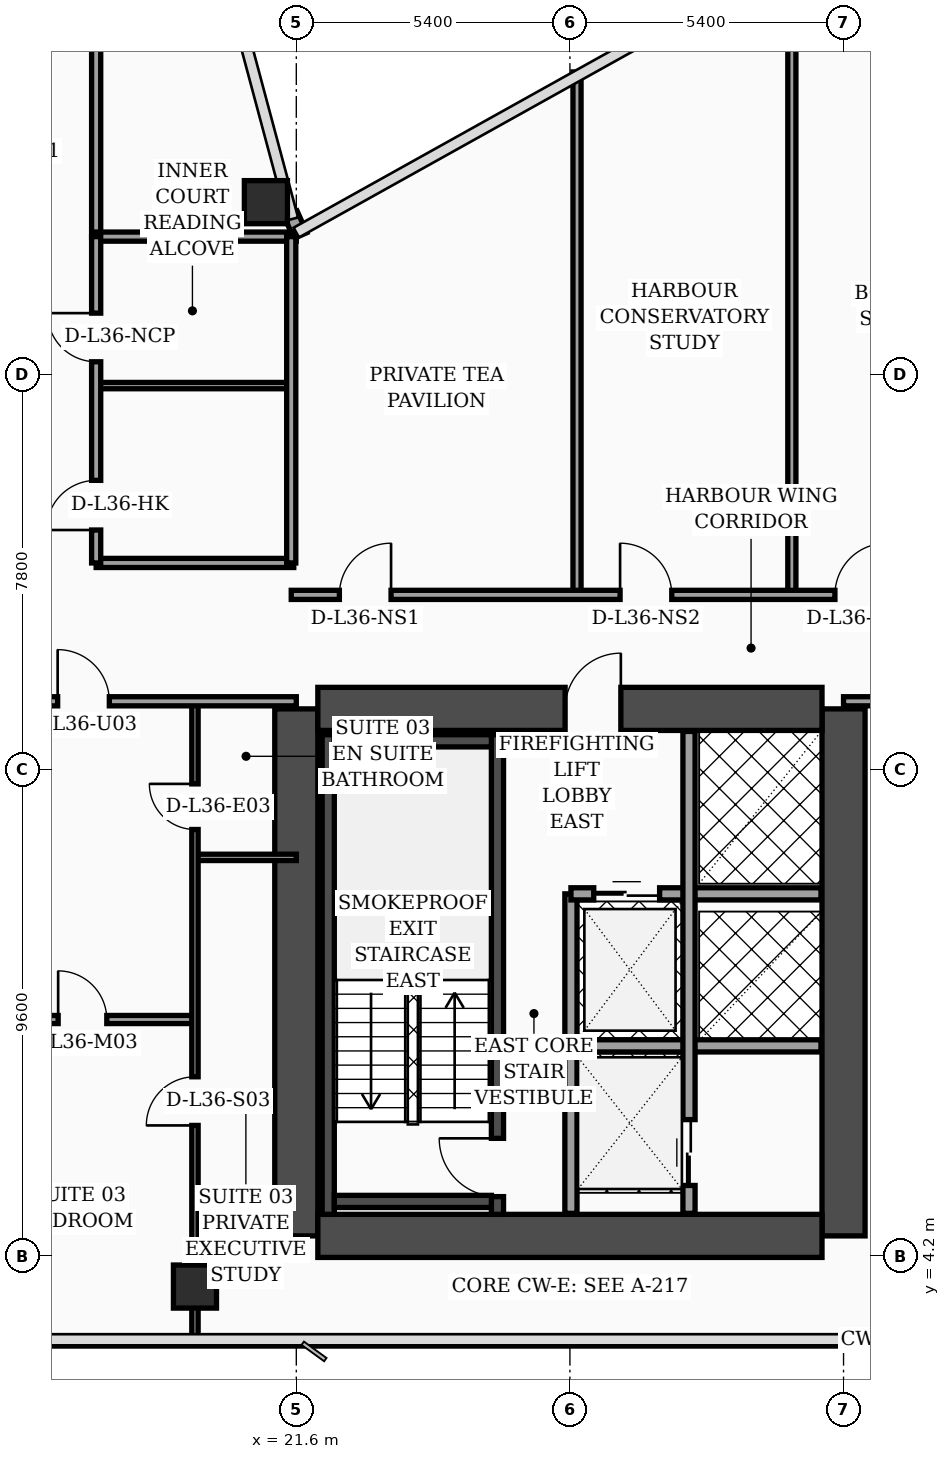
"""IFC4 building model, lengths in metres.
Left out: names, types, materials, properties, quantities, classifications, styles, units other than length and angle.
Written with IfcOpenShell. Run it as: python <this file> out.ifc"""

import sys

from ifc_helpers import new_model, si_unit, direction, frame, frame_2d, origin, origin_2d, place, context, subcontext, project, spatial, rectangle, hollow_rectangle, extrude, element, fill, save


model = new_model("IFC4")
c1 = context("Model", 3, precision=1e-05, world=origin(), true_north=direction((0.0, 1.0)))
c2 = subcontext(c1, "Body", "Model", "MODEL_VIEW")
j1 = project(units=[si_unit("LENGTHUNIT", "METRE"), si_unit("PLANEANGLEUNIT", "RADIAN")], contexts=[c1])
p1 = place(None, origin())
s1 = spatial("IfcSite", under=j1, at=p1, CompositionType="ELEMENT")
p2 = place(p1, origin())
s2 = spatial("IfcBuilding", under=s1, at=p2, CompositionType="ELEMENT")
p3 = place(p2, frame((0.0, 0.0, 148.5)))
s3 = spatial("IfcBuildingStorey", under=s2, at=p3, CompositionType="ELEMENT", Elevation=148.5)
for number, where, z_axis, x_axis in (
    (1, (21.6, 4.6, 0.0), (0.0, 0.0, 1.0), (0.0, 1.0, 0.0)),
    (2, (32.4, 4.6, 0.0), (0.0, 0.0, 1.0), (0.0, 1.0, 0.0)),
):
    element("IfcWall", number, at=place(p3, frame(where, z_axis=z_axis, x_axis=x_axis)), inside=s3, PredefinedType="SHEAR", context=c2, shape_type="SweptSolid", body=[
        extrude(rectangle(XDim=10.4, YDim=0.85, at=frame_2d((5.2, 0.0))), origin(), (0.0, 0.0, 1.0), 3.56),
    ])
p4 = place(p3, frame((22.025, 15.0, 0.0), z_axis=(0.0, 0.0, 1.0), x_axis=(1.0, 0.0, 0.0)))
e3 = element("IfcWall", 3, at=p4, inside=s3, PredefinedType="SHEAR", context=c2, shape_type="SweptSolid", body=[
    extrude(rectangle(XDim=9.95, YDim=0.85, at=frame_2d((4.975, 0.0))), origin(), (0.0, 0.0, 1.0), 3.56),
])
p5 = place(p4, frame((4.88, 0.0, 0.0)))
e4 = element("IfcOpeningElement", 4, at=p5, cuts=e3, PredefinedType="OPENING", context=c2, shape_type="SweptSolid", body=[
    extrude(rectangle(XDim=1.1, YDim=2.2, at=frame_2d((0.55, 1.1))), frame((0.0, 0.435, 0.0), z_axis=(0.0, -1.0, 0.0), x_axis=(1.0, 0.0, 0.0)), (0.0, 0.0, 1.0), 0.87),
])
p6 = place(p3, frame((22.025, 4.6, 0.0), z_axis=(0.0, 0.0, 1.0), x_axis=(1.0, 0.0, 0.0)))
e5 = element("IfcWall", 5, at=p6, inside=s3, PredefinedType="SHEAR", context=c2, shape_type="SweptSolid", body=[
    extrude(rectangle(XDim=9.95, YDim=0.85, at=frame_2d((4.975, 0.0))), origin(), (0.0, 0.0, 1.0), 3.56),
])
p7 = place(p3, frame((22.23, 5.025, 0.0), z_axis=(0.0, 0.0, 1.0), x_axis=(0.0, 1.0, 0.0)))
e6 = element("IfcWall", 6, at=p7, inside=s3, PredefinedType="SOLIDWALL", context=c2, shape_type="SweptSolid", body=[
    extrude(rectangle(XDim=9.465, YDim=0.24, at=frame_2d((4.732, 0.0))), origin(), (0.0, 0.0, 1.0), 3.56),
])
p8 = place(p3, frame((25.57, 5.025, 0.0), z_axis=(0.0, 0.0, 1.0), x_axis=(0.0, 1.0, 0.0)))
e7 = element("IfcWall", 7, at=p8, inside=s3, PredefinedType="SOLIDWALL", context=c2, shape_type="SweptSolid", body=[
    extrude(rectangle(XDim=9.465, YDim=0.24, at=frame_2d((4.732, 0.0))), origin(), (0.0, 0.0, 1.0), 3.56),
])
p9 = place(p8, frame((0.35, 0.0, 0.0)))
e8 = element("IfcOpeningElement", 8, at=p9, cuts=e7, PredefinedType="OPENING", context=c2, shape_type="SweptSolid", body=[
    extrude(rectangle(XDim=1.15, YDim=2.2, at=frame_2d((0.575, 1.1))), frame((0.0, 0.13, 0.0), z_axis=(0.0, -1.0, 0.0), x_axis=(1.0, 0.0, 0.0)), (0.0, 0.0, 1.0), 0.26),
])
for number, where, z_axis, x_axis in (
    (9, (22.35, 5.28, 0.0), (0.0, 0.0, 1.0), (1.0, 0.0, 0.0)),
    (10, (22.35, 14.37, 0.0), (0.0, 0.0, 1.0), (1.0, 0.0, 0.0)),
):
    element("IfcWall", number, at=place(p3, frame(where, z_axis=z_axis, x_axis=x_axis)), inside=s3, PredefinedType="SOLIDWALL", context=c2, shape_type="SweptSolid", body=[
        extrude(rectangle(XDim=3.1, YDim=0.24, at=frame_2d((1.55, 0.0))), origin(), (0.0, 0.0, 1.0), 3.56),
    ])
for number, where, z_axis, x_axis in (
    (11, (21.0, 25.0, 0.0), (0.0, 0.0, 1.0), (1.0, 0.0, 0.0)),
    (12, (19.6, 3.6, 0.0), (0.0, 0.0, 1.0), (1.0, 0.0, 0.0)),
):
    element("IfcColumn", number, at=place(p3, frame(where, z_axis=z_axis, x_axis=x_axis)), inside=s3, PredefinedType="COLUMN", context=c2, shape_type="SweptSolid", body=[
        extrude(hollow_rectangle(XDim=0.85, YDim=0.85, WallThickness=0.036, at=origin_2d()), origin(), (0.0, 0.0, 1.0), 3.56),
    ])
p10 = place(p3, frame((21.68, 24.34, 0.0), z_axis=(0.0, 0.0, 1.0), x_axis=(-0.40758134973, 0.913168901875, 0.0)))
e13 = element("IfcWall", 13, at=p10, inside=s3, PredefinedType="SOLIDWALL", context=c2, shape_type="SweptSolid", body=[
    extrude(rectangle(XDim=0.471, YDim=0.28, at=frame_2d((0.235, 0.0))), origin(), (0.0, 0.0, 1.0), 3.56),
])
p11 = place(p3, frame((27.02, 5.045, 0.0), z_axis=(0.0, 0.0, 1.0), x_axis=(0.0, 1.0, 0.0)))
e14 = element("IfcWall", 14, at=p11, inside=s3, PredefinedType="SOLIDWALL", context=c2, shape_type="SweptSolid", body=[
    extrude(rectangle(XDim=6.305, YDim=0.24, at=frame_2d((3.153, 0.0))), origin(), (0.0, 0.0, 1.0), 3.56),
])
p12 = place(p3, frame((27.02, 11.35, 0.0), z_axis=(0.0, 0.0, 1.0), x_axis=(1.0, 0.0, 0.0)))
e15 = element("IfcWall", 15, at=p12, inside=s3, PredefinedType="SOLIDWALL", context=c2, shape_type="SweptSolid", body=[
    extrude(rectangle(XDim=4.935, YDim=0.24, at=frame_2d((2.468, 0.0))), origin(), (0.0, 0.0, 1.0), 3.56),
])
p13 = place(p12, frame((0.45, 0.0, 0.0)))
e16 = element("IfcOpeningElement", 16, at=p13, cuts=e15, PredefinedType="OPENING", context=c2, shape_type="SweptSolid", body=[
    extrude(rectangle(XDim=1.3, YDim=2.35, at=frame_2d((0.65, 1.175))), frame((0.0, 0.13, 0.0), z_axis=(0.0, -1.0, 0.0), x_axis=(1.0, 0.0, 0.0)), (0.0, 0.0, 1.0), 0.26),
])
p14 = place(p3, frame((27.02, 8.35, 0.0), z_axis=(0.0, 0.0, 1.0), x_axis=(1.0, 0.0, 0.0)))
e17 = element("IfcWall", 17, at=p14, inside=s3, PredefinedType="SOLIDWALL", context=c2, shape_type="SweptSolid", body=[
    extrude(rectangle(XDim=4.935, YDim=0.24, at=frame_2d((2.468, 0.0))), origin(), (0.0, 0.0, 1.0), 3.56),
])
p15 = place(p3, frame((29.35, 5.045, 0.0), z_axis=(0.0, 0.0, 1.0), x_axis=(0.0, 1.0, 0.0)))
e18 = element("IfcWall", 18, at=p15, inside=s3, PredefinedType="SOLIDWALL", context=c2, shape_type="SweptSolid", body=[
    extrude(rectangle(XDim=9.51, YDim=0.24, at=frame_2d((4.755, 0.0))), origin(), (0.0, 0.0, 1.0), 3.56),
])
p16 = place(p15, frame((0.55, 0.0, 0.0)))
e19 = element("IfcOpeningElement", 19, at=p16, cuts=e18, PredefinedType="OPENING", context=c2, shape_type="SweptSolid", body=[
    extrude(rectangle(XDim=1.3, YDim=2.35, at=frame_2d((0.65, 1.175))), frame((0.0, 0.13, 0.0), z_axis=(0.0, -1.0, 0.0), x_axis=(1.0, 0.0, 0.0)), (0.0, 0.0, 1.0), 0.26),
])
p17 = place(p3, frame((19.6, 12.07, 0.0), z_axis=(0.0, 0.0, 1.0), x_axis=(1.0, 0.0, 0.0)))
e20 = element("IfcWall", 20, at=p17, inside=s3, PredefinedType="PARTITIONING", context=c2, shape_type="SweptSolid", body=[
    extrude(rectangle(XDim=2.0, YDim=0.125, at=frame_2d((1.0, 0.0))), origin(), (0.0, 0.0, 1.0), 3.56),
])
p18 = place(p3, frame((15.15, 8.87, 0.0), z_axis=(0.0, 0.0, 1.0), x_axis=(1.0, 0.0, 0.0)))
e21 = element("IfcWall", 21, at=p18, inside=s3, PredefinedType="PARTITIONING", context=c2, shape_type="SweptSolid", body=[
    extrude(rectangle(XDim=4.45, YDim=0.16, at=frame_2d((2.225, 0.0))), origin(), (0.0, 0.0, 1.0), 3.56),
])
p19 = place(p18, frame((1.75, 0.0, 0.0)))
e22 = element("IfcOpeningElement", 22, at=p19, cuts=e21, PredefinedType="OPENING", context=c2, shape_type="SweptSolid", body=[
    extrude(rectangle(XDim=0.96, YDim=2.2, at=frame_2d((0.48, 1.1))), frame((0.0, 0.09, 0.0), z_axis=(0.0, -1.0, 0.0), x_axis=(1.0, 0.0, 0.0)), (0.0, 0.0, 1.0), 0.18),
])
p20 = place(p3, frame((19.6, 2.44, 0.0), z_axis=(0.0, 0.0, 1.0), x_axis=(0.0, 1.0, 0.0)))
e23 = element("IfcWall", 23, at=p20, inside=s3, PredefinedType="PARTITIONING", context=c2, shape_type="SweptSolid", body=[
    extrude(rectangle(XDim=12.71, YDim=0.125, at=frame_2d((6.355, 0.0))), origin(), (0.0, 0.0, 1.0), 2.49),
])
p21 = place(p20, frame((4.34, 0.0, 0.0)))
e24 = element("IfcOpeningElement", 24, at=p21, cuts=e23, PredefinedType="OPENING", context=c2, shape_type="SweptSolid", body=[
    extrude(rectangle(XDim=0.96, YDim=2.2, at=frame_2d((0.48, 1.1))), frame((0.0, 0.073, 0.0), z_axis=(0.0, -1.0, 0.0), x_axis=(1.0, 0.0, 0.0)), (0.0, 0.0, 1.0), 0.145),
])
p22 = place(p20, frame((10.18, 0.0, 0.0)))
e25 = element("IfcOpeningElement", 25, at=p22, cuts=e23, PredefinedType="OPENING", context=c2, shape_type="SweptSolid", body=[
    extrude(rectangle(XDim=0.9, YDim=2.15, at=frame_2d((0.45, 1.075))), frame((0.0, 0.073, 0.0), z_axis=(0.0, -1.0, 0.0), x_axis=(1.0, 0.0, 0.0)), (0.0, 0.0, 1.0), 0.145),
])
p23 = place(p3, frame((15.15, 15.15, 0.0), z_axis=(0.0, 0.0, 1.0), x_axis=(1.0, 0.0, 0.0)))
e26 = element("IfcWall", 26, at=p23, inside=s3, PredefinedType="PARTITIONING", context=c2, shape_type="SweptSolid", body=[
    extrude(rectangle(XDim=6.45, YDim=0.18, at=frame_2d((3.225, 0.0))), origin(), (0.0, 0.0, 1.0), 2.49),
])
p24 = place(p23, frame((1.74, 0.0, 0.0)))
e27 = element("IfcOpeningElement", 27, at=p24, cuts=e26, PredefinedType="OPENING", context=c2, shape_type="SweptSolid", body=[
    extrude(rectangle(XDim=1.02, YDim=2.2, at=frame_2d((0.51, 1.1))), frame((0.0, 0.1, 0.0), z_axis=(0.0, -1.0, 0.0), x_axis=(1.0, 0.0, 0.0)), (0.0, 0.0, 1.0), 0.2),
])
p25 = place(p3, frame((17.65, 24.3, 0.0), z_axis=(0.0, 0.0, 1.0), x_axis=(0.0, 1.0, 0.0)))
e28 = element("IfcWall", 28, at=p25, inside=s3, PredefinedType="PARTITIONING", context=c2, shape_type="SweptSolid", body=[
    extrude(rectangle(XDim=17.65, YDim=0.18, at=frame_2d((8.825, 0.0))), origin(), (0.0, 0.0, 1.0), 2.94),
])
p26 = place(p3, frame((17.65, 17.88, 0.0), z_axis=(0.0, 0.0, 1.0), x_axis=(1.0, 0.0, 0.0)))
e29 = element("IfcWall", 29, at=p26, inside=s3, PredefinedType="PARTITIONING", context=c2, shape_type="SweptSolid", body=[
    extrude(rectangle(XDim=3.9, YDim=0.18, at=frame_2d((1.95, 0.0))), origin(), (0.0, 0.0, 1.0), 3.09),
])
p27 = place(p3, frame((17.65, 21.38, 0.0), z_axis=(0.0, 0.0, 1.0), x_axis=(1.0, 0.0, 0.0)))
e30 = element("IfcWall", 30, at=p27, inside=s3, PredefinedType="PARTITIONING", context=c2, shape_type="SweptSolid", body=[
    extrude(rectangle(XDim=3.9, YDim=0.125, at=frame_2d((1.95, 0.0))), origin(), (0.0, 0.0, 1.0), 3.56),
])
p28 = place(p3, frame((17.65, 24.32, 0.0), z_axis=(0.0, 0.0, 1.0), x_axis=(1.0, 0.0, 0.0)))
e31 = element("IfcWall", 31, at=p28, inside=s3, PredefinedType="PARTITIONING", context=c2, shape_type="SweptSolid", body=[
    extrude(rectangle(XDim=3.95, YDim=0.18, at=frame_2d((1.975, 0.0))), origin(), (0.0, 0.0, 1.0), 3.56),
])
p29 = place(p3, frame((21.5, 17.88, 0.0), z_axis=(0.0, 0.0, 1.0), x_axis=(0.0, 1.0, 0.0)))
e32 = element("IfcWall", 32, at=p29, inside=s3, PredefinedType="PARTITIONING", context=c2, shape_type="SweptSolid", body=[
    extrude(rectangle(XDim=6.44, YDim=0.18, at=frame_2d((3.22, 0.0))), origin(), (0.0, 0.0, 1.0), 3.09),
])
p30 = place(p3, frame((17.65, 17.88, 0.0), z_axis=(0.0, 0.0, 1.0), x_axis=(0.0, 1.0, 0.0)))
e33 = element("IfcWall", 33, at=p30, inside=s3, PredefinedType="PARTITIONING", context=c2, shape_type="SweptSolid", body=[
    extrude(rectangle(XDim=6.44, YDim=0.18, at=frame_2d((3.22, 0.0))), origin(), (0.0, 0.0, 1.0), 3.09),
])
p31 = place(p30, frame((0.65, 0.0, 0.0)))
e34 = element("IfcOpeningElement", 34, at=p31, cuts=e33, PredefinedType="OPENING", context=c2, shape_type="SweptSolid", body=[
    extrude(rectangle(XDim=0.98, YDim=2.15, at=frame_2d((0.49, 1.075))), frame((0.0, 0.1, 0.0), z_axis=(0.0, -1.0, 0.0), x_axis=(1.0, 0.0, 0.0)), (0.0, 0.0, 1.0), 0.2),
])
p32 = place(p30, frame((3.97, 0.0, 0.0)))
e35 = element("IfcOpeningElement", 35, at=p32, cuts=e33, PredefinedType="OPENING", context=c2, shape_type="SweptSolid", body=[
    extrude(rectangle(XDim=0.96, YDim=2.2, at=frame_2d((0.48, 1.1))), frame((0.0, 0.1, 0.0), z_axis=(0.0, -1.0, 0.0), x_axis=(1.0, 0.0, 0.0)), (0.0, 0.0, 1.0), 0.2),
])
p33 = place(p3, frame((32.4, 15.15, 0.0), z_axis=(0.0, 0.0, 1.0), x_axis=(1.0, 0.0, 0.0)))
e36 = element("IfcWall", 36, at=p33, inside=s3, PredefinedType="PARTITIONING", context=c2, shape_type="SweptSolid", body=[
    extrude(rectangle(XDim=11.1, YDim=0.18, at=frame_2d((5.55, 0.0))), origin(), (0.0, 0.0, 1.0), 2.94),
])
p34 = place(p33, frame((1.1, 0.0, 0.0)))
e37 = element("IfcOpeningElement", 37, at=p34, cuts=e36, PredefinedType="OPENING", context=c2, shape_type="SweptSolid", body=[
    extrude(rectangle(XDim=1.5, YDim=2.22, at=frame_2d((0.75, 1.11))), frame((0.0, 0.1, 0.0), z_axis=(0.0, -1.0, 0.0), x_axis=(1.0, 0.0, 0.0)), (0.0, 0.0, 1.0), 0.2),
])
p35 = place(p33, frame((7.3, 0.0, 0.0)))
e38 = element("IfcOpeningElement", 38, at=p35, cuts=e36, PredefinedType="OPENING", context=c2, shape_type="SweptSolid", body=[
    extrude(rectangle(XDim=1.02, YDim=2.2, at=frame_2d((0.51, 1.1))), frame((0.0, 0.1, 0.0), z_axis=(0.0, -1.0, 0.0), x_axis=(1.0, 0.0, 0.0)), (0.0, 0.0, 1.0), 0.2),
])
p36 = place(p3, frame((27.14, 17.25, 0.0), z_axis=(0.0, 0.0, 1.0), x_axis=(0.0, 1.0, 0.0)))
e39 = element("IfcWall", 39, at=p36, inside=s3, PredefinedType="PARTITIONING", context=c2, shape_type="SweptSolid", body=[
    extrude(rectangle(XDim=10.32, YDim=0.16, at=frame_2d((5.16, 0.0))), origin(), (0.0, 0.0, 1.0), 2.94),
])
p37 = place(p3, frame((31.38, 17.25, 0.0), z_axis=(0.0, 0.0, 1.0), x_axis=(0.0, 1.0, 0.0)))
e40 = element("IfcWall", 40, at=p37, inside=s3, PredefinedType="PARTITIONING", context=c2, shape_type="SweptSolid", body=[
    extrude(rectangle(XDim=12.68, YDim=0.16, at=frame_2d((6.34, 0.0))), origin(), (0.0, 0.0, 1.0), 2.94),
])
p38 = place(p3, frame((21.5, 17.25, 0.0), z_axis=(0.0, 0.0, 1.0), x_axis=(1.0, 0.0, 0.0)))
e41 = element("IfcWall", 41, at=p38, inside=s3, PredefinedType="PARTITIONING", context=c2, shape_type="SweptSolid", body=[
    extrude(rectangle(XDim=19.65, YDim=0.18, at=frame_2d((9.825, 0.0))), origin(), (0.0, 0.0, 1.0), 2.94),
])
p39 = place(p38, frame((0.95, 0.0, 0.0)))
e42 = element("IfcOpeningElement", 42, at=p39, cuts=e41, PredefinedType="OPENING", context=c2, shape_type="SweptSolid", body=[
    extrude(rectangle(XDim=1.02, YDim=2.2, at=frame_2d((0.51, 1.1))), frame((0.0, 0.1, 0.0), z_axis=(0.0, -1.0, 0.0), x_axis=(1.0, 0.0, 0.0)), (0.0, 0.0, 1.0), 0.2),
])
p40 = place(p38, frame((6.49, 0.0, 0.0)))
e43 = element("IfcOpeningElement", 43, at=p40, cuts=e41, PredefinedType="OPENING", context=c2, shape_type="SweptSolid", body=[
    extrude(rectangle(XDim=1.02, YDim=2.2, at=frame_2d((0.51, 1.1))), frame((0.0, 0.1, 0.0), z_axis=(0.0, -1.0, 0.0), x_axis=(1.0, 0.0, 0.0)), (0.0, 0.0, 1.0), 0.2),
])
p41 = place(p38, frame((10.73, 0.0, 0.0)))
e44 = element("IfcOpeningElement", 44, at=p41, cuts=e41, PredefinedType="OPENING", context=c2, shape_type="SweptSolid", body=[
    extrude(rectangle(XDim=1.02, YDim=2.2, at=frame_2d((0.51, 1.1))), frame((0.0, 0.1, 0.0), z_axis=(0.0, -1.0, 0.0), x_axis=(1.0, 0.0, 0.0)), (0.0, 0.0, 1.0), 0.2),
])
p42 = place(p38, frame((15.61, 0.0, 0.0)))
e45 = element("IfcOpeningElement", 45, at=p42, cuts=e41, PredefinedType="OPENING", context=c2, shape_type="SweptSolid", body=[
    extrude(rectangle(XDim=1.02, YDim=2.2, at=frame_2d((0.51, 1.1))), frame((0.0, 0.1, 0.0), z_axis=(0.0, -1.0, 0.0), x_axis=(1.0, 0.0, 0.0)), (0.0, 0.0, 1.0), 0.2),
])
p43 = place(p13, origin())
e46 = element("IfcDoor", 46, at=p43, inside=s3, OperationType="DOUBLE_DOOR_SLIDING", PredefinedType="DOOR", context=c2, shape_type="SweptSolid", body=[
    extrude(rectangle(XDim=1.3, YDim=2.35, at=frame_2d((0.65, 1.175))), frame((0.0, 0.025, 0.0), z_axis=(0.0, -1.0, 0.0), x_axis=(1.0, 0.0, 0.0)), (0.0, 0.0, 1.0), 0.05),
])
fill(e16, e46)
p44 = place(p16, origin())
e47 = element("IfcDoor", 47, at=p44, inside=s3, OperationType="DOUBLE_DOOR_SLIDING", PredefinedType="DOOR", context=c2, shape_type="SweptSolid", body=[
    extrude(rectangle(XDim=1.3, YDim=2.35, at=frame_2d((0.65, 1.175))), frame((0.0, 0.025, 0.0), z_axis=(0.0, -1.0, 0.0), x_axis=(1.0, 0.0, 0.0)), (0.0, 0.0, 1.0), 0.05),
])
fill(e19, e47)
p45 = place(p19, origin())
e48 = element("IfcDoor", 48, at=p45, inside=s3, OperationType="SINGLE_SWING_LEFT", PredefinedType="DOOR", context=c2, shape_type="SweptSolid", body=[
    extrude(rectangle(XDim=0.96, YDim=2.2, at=frame_2d((0.48, 1.1))), frame((0.0, 0.025, 0.0), z_axis=(0.0, -1.0, 0.0), x_axis=(1.0, 0.0, 0.0)), (0.0, 0.0, 1.0), 0.05),
])
fill(e22, e48)
p46 = place(p21, origin())
e49 = element("IfcDoor", 49, at=p46, inside=s3, OperationType="SINGLE_SWING_LEFT", PredefinedType="DOOR", context=c2, shape_type="SweptSolid", body=[
    extrude(rectangle(XDim=0.96, YDim=2.2, at=frame_2d((0.48, 1.1))), frame((0.0, 0.025, 0.0), z_axis=(0.0, -1.0, 0.0), x_axis=(1.0, 0.0, 0.0)), (0.0, 0.0, 1.0), 0.05),
])
fill(e24, e49)
p47 = place(p22, origin())
e50 = element("IfcDoor", 50, at=p47, inside=s3, OperationType="SINGLE_SWING_RIGHT", PredefinedType="DOOR", context=c2, shape_type="SweptSolid", body=[
    extrude(rectangle(XDim=0.9, YDim=2.15, at=frame_2d((0.45, 1.075))), frame((0.0, 0.025, 0.0), z_axis=(0.0, -1.0, 0.0), x_axis=(1.0, 0.0, 0.0)), (0.0, 0.0, 1.0), 0.05),
])
fill(e25, e50)
p48 = place(p24, origin())
e51 = element("IfcDoor", 51, at=p48, inside=s3, OperationType="SINGLE_SWING_LEFT", PredefinedType="DOOR", context=c2, shape_type="SweptSolid", body=[
    extrude(rectangle(XDim=1.02, YDim=2.2, at=frame_2d((0.51, 1.1))), frame((0.0, 0.025, 0.0), z_axis=(0.0, -1.0, 0.0), x_axis=(1.0, 0.0, 0.0)), (0.0, 0.0, 1.0), 0.05),
])
fill(e27, e51)
p49 = place(p31, origin())
e52 = element("IfcDoor", 52, at=p49, inside=s3, OperationType="SINGLE_SWING_LEFT", PredefinedType="DOOR", context=c2, shape_type="SweptSolid", body=[
    extrude(rectangle(XDim=0.98, YDim=2.15, at=frame_2d((0.49, 1.075))), frame((0.0, 0.025, 0.0), z_axis=(0.0, -1.0, 0.0), x_axis=(1.0, 0.0, 0.0)), (0.0, 0.0, 1.0), 0.05),
])
fill(e34, e52)
p50 = place(p32, origin())
e53 = element("IfcDoor", 53, at=p50, inside=s3, OperationType="SINGLE_SWING_RIGHT", PredefinedType="DOOR", context=c2, shape_type="SweptSolid", body=[
    extrude(rectangle(XDim=0.96, YDim=2.2, at=frame_2d((0.48, 1.1))), frame((0.0, 0.025, 0.0), z_axis=(0.0, -1.0, 0.0), x_axis=(1.0, 0.0, 0.0)), (0.0, 0.0, 1.0), 0.05),
])
fill(e35, e53)
p51 = place(p39, origin())
e54 = element("IfcDoor", 54, at=p51, inside=s3, OperationType="SINGLE_SWING_RIGHT", PredefinedType="DOOR", context=c2, shape_type="SweptSolid", body=[
    extrude(rectangle(XDim=1.02, YDim=2.2, at=frame_2d((0.51, 1.1))), frame((0.0, 0.025, 0.0), z_axis=(0.0, -1.0, 0.0), x_axis=(1.0, 0.0, 0.0)), (0.0, 0.0, 1.0), 0.05),
])
fill(e42, e54)
p52 = place(p40, origin())
e55 = element("IfcDoor", 55, at=p52, inside=s3, OperationType="SINGLE_SWING_LEFT", PredefinedType="DOOR", context=c2, shape_type="SweptSolid", body=[
    extrude(rectangle(XDim=1.02, YDim=2.2, at=frame_2d((0.51, 1.1))), frame((0.0, 0.025, 0.0), z_axis=(0.0, -1.0, 0.0), x_axis=(1.0, 0.0, 0.0)), (0.0, 0.0, 1.0), 0.05),
])
fill(e43, e55)
p53 = place(p41, origin())
e56 = element("IfcDoor", 56, at=p53, inside=s3, OperationType="SINGLE_SWING_RIGHT", PredefinedType="DOOR", context=c2, shape_type="SweptSolid", body=[
    extrude(rectangle(XDim=1.02, YDim=2.2, at=frame_2d((0.51, 1.1))), frame((0.0, 0.025, 0.0), z_axis=(0.0, -1.0, 0.0), x_axis=(1.0, 0.0, 0.0)), (0.0, 0.0, 1.0), 0.05),
])
fill(e44, e56)
p54 = place(p9, origin())
e57 = element("IfcDoor", 57, at=p54, inside=s3, OperationType="SINGLE_SWING_RIGHT", PredefinedType="DOOR", context=c2, shape_type="SweptSolid", body=[
    extrude(rectangle(XDim=1.15, YDim=2.2, at=frame_2d((0.575, 1.1))), frame((0.0, 0.025, 0.0), z_axis=(0.0, -1.0, 0.0), x_axis=(1.0, 0.0, 0.0)), (0.0, 0.0, 1.0), 0.05),
])
fill(e8, e57)
p55 = place(p5, origin())
e58 = element("IfcDoor", 58, at=p55, inside=s3, OperationType="SINGLE_SWING_RIGHT", PredefinedType="DOOR", context=c2, shape_type="SweptSolid", body=[
    extrude(rectangle(XDim=1.1, YDim=2.2, at=frame_2d((0.55, 1.1))), frame((0.0, 0.025, 0.0), z_axis=(0.0, -1.0, 0.0), x_axis=(1.0, 0.0, 0.0)), (0.0, 0.0, 1.0), 0.05),
])
fill(e4, e58)
save(model, sys.argv[1])
